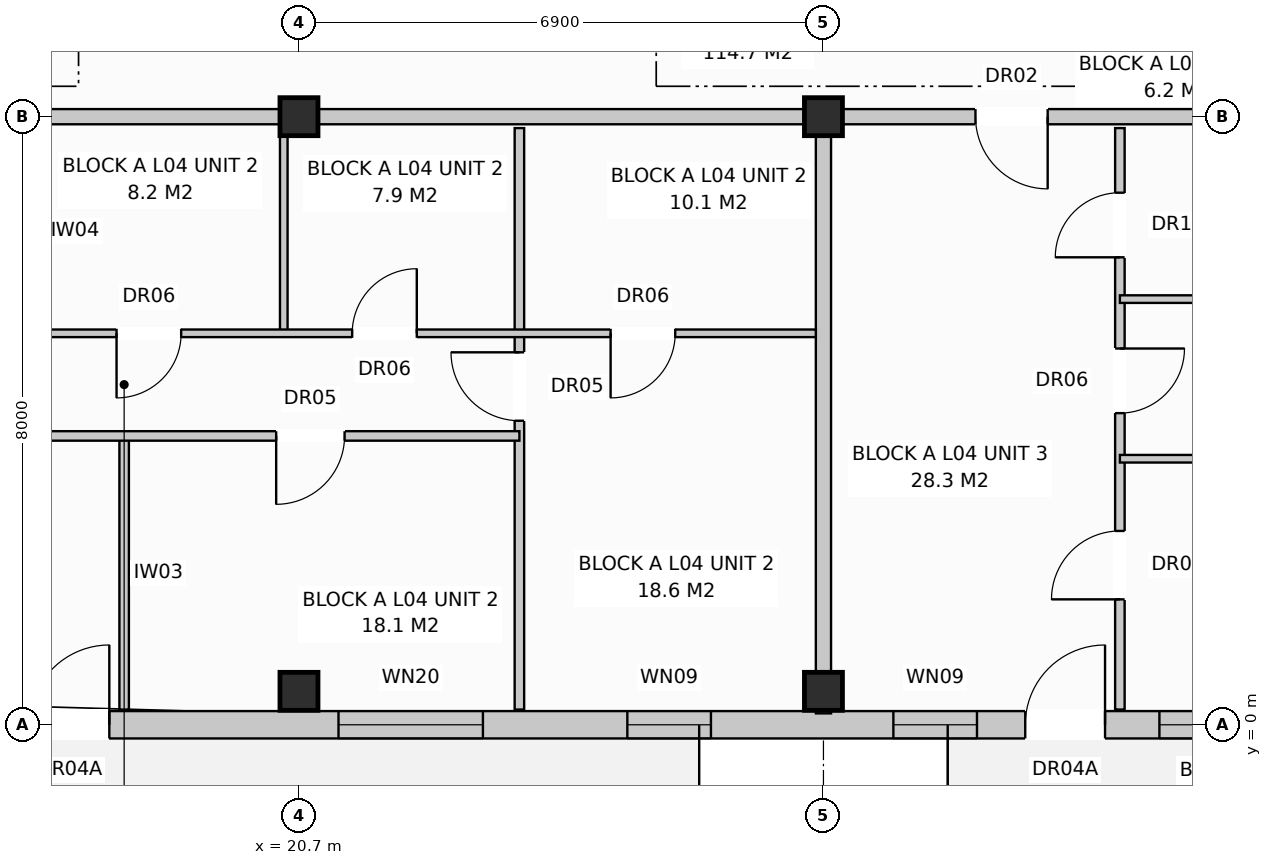
"""IFC4 building model, lengths in metres.
Left out: names, types, materials, properties, quantities, classifications, styles, units other than length and angle.
Written with IfcOpenShell. Run it as: python <this file> out.ifc"""

import sys

from ifc_helpers import new_model, si_unit, direction, frame, frame_2d, origin, origin_with_axes, origin_2d, place, context, subcontext, project, spatial, rectangle, extrude, element, fill, save


model = new_model("IFC4")
c1 = context("Model", 3, precision=1e-05, world=origin(), true_north=direction((0.0, 1.0)))
c2 = subcontext(c1, "Body", "Model", "MODEL_VIEW")
j1 = project(units=[si_unit("LENGTHUNIT", "METRE"), si_unit("PLANEANGLEUNIT", "RADIAN")], contexts=[c1])
p1 = place(None, origin())
s1 = spatial("IfcSite", under=j1, at=p1, CompositionType="ELEMENT")
p2 = place(p1, origin())
s2 = spatial("IfcBuilding", under=s1, at=p2, CompositionType="ELEMENT")
p3 = place(p2, frame((0.0, 0.0, 14.4)))
s3 = spatial("IfcBuildingStorey", under=s2, at=p3, CompositionType="ELEMENT", Elevation=14.4)
for number, where, z_axis, x_axis in (
    (1, (20.7, 0.44, 0.0), (0.0, 0.0, 1.0), (1.0, 0.0, 0.0)),
    (2, (20.7, 8.0, 0.0), (0.0, 0.0, 1.0), (1.0, 0.0, 0.0)),
    (3, (27.6, 0.44, 0.0), (0.0, 0.0, 1.0), (1.0, 0.0, 0.0)),
    (4, (27.6, 8.0, 0.0), (0.0, 0.0, 1.0), (1.0, 0.0, 0.0)),
):
    element("IfcColumn", number, at=place(p3, frame(where, z_axis=z_axis, x_axis=x_axis)), inside=s3, PredefinedType="COLUMN", context=c2, shape_type="SweptSolid", body=[
        extrude(rectangle(XDim=0.5, YDim=0.5, at=origin_2d()), origin(), (0.0, 0.0, 1.0), 3.2),
    ])
p4 = place(p3, frame((0.17, 0.0, 0.0), z_axis=(0.0, 0.0, 1.0), x_axis=(1.0, 0.0, 0.0)))
e5 = element("IfcWall", 5, at=p4, inside=s3, PredefinedType="STANDARD", context=c2, shape_type="SweptSolid", body=[
    extrude(rectangle(XDim=54.86, YDim=0.36, at=frame_2d((27.43, 0.0))), origin(), (0.0, 0.0, 1.0), 2.94),
])
p5 = place(p4, frame((2.485, 0.0, 0.0)))
e6 = element("IfcOpeningElement", 6, at=p5, cuts=e5, PredefinedType="OPENING", context=c2, shape_type="SweptSolid", body=[
    extrude(rectangle(XDim=1.05, YDim=2.12, at=frame_2d((0.525, 1.06))), frame((0.0, 0.192, 0.0), z_axis=(0.0, -1.0, 0.0), x_axis=(1.0, 0.0, 0.0)), (0.0, 0.0, 1.0), 0.384),
])
p6 = place(p4, frame((16.985, 0.0, 0.0)))
e7 = element("IfcOpeningElement", 7, at=p6, cuts=e5, PredefinedType="OPENING", context=c2, shape_type="SweptSolid", body=[
    extrude(rectangle(XDim=1.05, YDim=2.12, at=frame_2d((0.525, 1.06))), frame((0.0, 0.192, 0.0), z_axis=(0.0, -1.0, 0.0), x_axis=(1.0, 0.0, 0.0)), (0.0, 0.0, 1.0), 0.384),
])
p7 = place(p4, frame((30.085, 0.0, 0.0)))
e8 = element("IfcOpeningElement", 8, at=p7, cuts=e5, PredefinedType="OPENING", context=c2, shape_type="SweptSolid", body=[
    extrude(rectangle(XDim=1.05, YDim=2.12, at=frame_2d((0.525, 1.06))), frame((0.0, 0.192, 0.0), z_axis=(0.0, -1.0, 0.0), x_axis=(1.0, 0.0, 0.0)), (0.0, 0.0, 1.0), 0.384),
])
p8 = place(p4, frame((44.141, 0.0, 0.0)))
e9 = element("IfcOpeningElement", 9, at=p8, cuts=e5, PredefinedType="OPENING", context=c2, shape_type="SweptSolid", body=[
    extrude(rectangle(XDim=1.05, YDim=2.12, at=frame_2d((0.525, 1.06))), frame((0.0, 0.192, 0.0), z_axis=(0.0, -1.0, 0.0), x_axis=(1.0, 0.0, 0.0)), (0.0, 0.0, 1.0), 0.384),
])
p9 = place(p4, frame((0.75, 0.0, 0.72)))
e10 = element("IfcOpeningElement", 10, at=p9, cuts=e5, PredefinedType="OPENING", context=c2, shape_type="SweptSolid", body=[
    extrude(rectangle(XDim=1.1, YDim=1.5, at=frame_2d((0.55, 0.75))), frame((0.0, 0.192, 0.0), z_axis=(0.0, -1.0, 0.0), x_axis=(1.0, 0.0, 0.0)), (0.0, 0.0, 1.0), 0.384),
])
p10 = place(p4, frame((4.25, 0.0, 0.72)))
e11 = element("IfcOpeningElement", 11, at=p10, cuts=e5, PredefinedType="OPENING", context=c2, shape_type="SweptSolid", body=[
    extrude(rectangle(XDim=1.9, YDim=1.85, at=frame_2d((0.95, 0.925))), frame((0.0, 0.192, 0.0), z_axis=(0.0, -1.0, 0.0), x_axis=(1.0, 0.0, 0.0)), (0.0, 0.0, 1.0), 0.384),
])
p11 = place(p4, frame((8.925, 0.0, 0.8)))
e12 = element("IfcOpeningElement", 12, at=p11, cuts=e5, PredefinedType="OPENING", context=c2, shape_type="SweptSolid", body=[
    extrude(rectangle(XDim=1.95, YDim=1.65, at=frame_2d((0.975, 0.825))), frame((0.0, 0.192, 0.0), z_axis=(0.0, -1.0, 0.0), x_axis=(1.0, 0.0, 0.0)), (0.0, 0.0, 1.0), 0.384),
])
p12 = place(p4, frame((15.05, 0.0, 0.72)))
e13 = element("IfcOpeningElement", 13, at=p12, cuts=e5, PredefinedType="OPENING", context=c2, shape_type="SweptSolid", body=[
    extrude(rectangle(XDim=1.1, YDim=1.5, at=frame_2d((0.55, 0.75))), frame((0.0, 0.192, 0.0), z_axis=(0.0, -1.0, 0.0), x_axis=(1.0, 0.0, 0.0)), (0.0, 0.0, 1.0), 0.384),
])
p13 = place(p4, frame((21.05, 0.0, 0.72)))
e14 = element("IfcOpeningElement", 14, at=p13, cuts=e5, PredefinedType="OPENING", context=c2, shape_type="SweptSolid", body=[
    extrude(rectangle(XDim=1.9, YDim=1.85, at=frame_2d((0.95, 0.925))), frame((0.0, 0.192, 0.0), z_axis=(0.0, -1.0, 0.0), x_axis=(1.0, 0.0, 0.0)), (0.0, 0.0, 1.0), 0.384),
])
p14 = place(p4, frame((24.85, 0.0, 0.72)))
e15 = element("IfcOpeningElement", 15, at=p14, cuts=e5, PredefinedType="OPENING", context=c2, shape_type="SweptSolid", body=[
    extrude(rectangle(XDim=1.1, YDim=1.5, at=frame_2d((0.55, 0.75))), frame((0.0, 0.192, 0.0), z_axis=(0.0, -1.0, 0.0), x_axis=(1.0, 0.0, 0.0)), (0.0, 0.0, 1.0), 0.384),
])
p15 = place(p4, frame((28.35, 0.0, 0.72)))
e16 = element("IfcOpeningElement", 16, at=p15, cuts=e5, PredefinedType="OPENING", context=c2, shape_type="SweptSolid", body=[
    extrude(rectangle(XDim=1.1, YDim=1.5, at=frame_2d((0.55, 0.75))), frame((0.0, 0.192, 0.0), z_axis=(0.0, -1.0, 0.0), x_axis=(1.0, 0.0, 0.0)), (0.0, 0.0, 1.0), 0.384),
])
p16 = place(p4, frame((31.85, 0.0, 0.72)))
e17 = element("IfcOpeningElement", 17, at=p16, cuts=e5, PredefinedType="OPENING", context=c2, shape_type="SweptSolid", body=[
    extrude(rectangle(XDim=1.9, YDim=1.85, at=frame_2d((0.95, 0.925))), frame((0.0, 0.192, 0.0), z_axis=(0.0, -1.0, 0.0), x_axis=(1.0, 0.0, 0.0)), (0.0, 0.0, 1.0), 0.384),
])
p17 = place(p4, frame((35.525, 0.0, 0.8)))
e18 = element("IfcOpeningElement", 18, at=p17, cuts=e5, PredefinedType="OPENING", context=c2, shape_type="SweptSolid", body=[
    extrude(rectangle(XDim=1.95, YDim=1.65, at=frame_2d((0.975, 0.825))), frame((0.0, 0.192, 0.0), z_axis=(0.0, -1.0, 0.0), x_axis=(1.0, 0.0, 0.0)), (0.0, 0.0, 1.0), 0.384),
])
p18 = place(p4, frame((39.25, 0.0, 0.72)))
e19 = element("IfcOpeningElement", 19, at=p18, cuts=e5, PredefinedType="OPENING", context=c2, shape_type="SweptSolid", body=[
    extrude(rectangle(XDim=1.1, YDim=1.5, at=frame_2d((0.55, 0.75))), frame((0.0, 0.192, 0.0), z_axis=(0.0, -1.0, 0.0), x_axis=(1.0, 0.0, 0.0)), (0.0, 0.0, 1.0), 0.384),
])
p19 = place(p4, frame((42.35, 0.0, 0.72)))
e20 = element("IfcOpeningElement", 20, at=p19, cuts=e5, PredefinedType="OPENING", context=c2, shape_type="SweptSolid", body=[
    extrude(rectangle(XDim=1.1, YDim=1.5, at=frame_2d((0.55, 0.75))), frame((0.0, 0.192, 0.0), z_axis=(0.0, -1.0, 0.0), x_axis=(1.0, 0.0, 0.0)), (0.0, 0.0, 1.0), 0.384),
])
p20 = place(p4, frame((45.725, 0.0, 0.8)))
e21 = element("IfcOpeningElement", 21, at=p20, cuts=e5, PredefinedType="OPENING", context=c2, shape_type="SweptSolid", body=[
    extrude(rectangle(XDim=1.95, YDim=1.65, at=frame_2d((0.975, 0.825))), frame((0.0, 0.192, 0.0), z_axis=(0.0, -1.0, 0.0), x_axis=(1.0, 0.0, 0.0)), (0.0, 0.0, 1.0), 0.384),
])
p21 = place(p4, frame((51.85, 0.0, 0.72)))
e22 = element("IfcOpeningElement", 22, at=p21, cuts=e5, PredefinedType="OPENING", context=c2, shape_type="SweptSolid", body=[
    extrude(rectangle(XDim=1.1, YDim=1.5, at=frame_2d((0.55, 0.75))), frame((0.0, 0.192, 0.0), z_axis=(0.0, -1.0, 0.0), x_axis=(1.0, 0.0, 0.0)), (0.0, 0.0, 1.0), 0.384),
])
p22 = place(p3, frame((27.6, 7.85, 0.0), z_axis=(0.0, 0.0, 1.0), x_axis=(0.0, -1.0, 0.0)))
e23 = element("IfcWall", 23, at=p22, inside=s3, PredefinedType="PARTITIONING", context=c2, shape_type="SweptSolid", body=[
    extrude(rectangle(XDim=7.7, YDim=0.2, at=frame_2d((3.85, 0.0))), origin(), (0.0, 0.0, 1.0), 2.94),
])
p23 = place(p3, frame((6.9, 8.0, 0.0), z_axis=(0.0, 0.0, 1.0), x_axis=(1.0, 0.0, 0.0)))
e24 = element("IfcWall", 24, at=p23, inside=s3, PredefinedType="PARTITIONING", context=c2, shape_type="SweptSolid", body=[
    extrude(rectangle(XDim=20.7, YDim=0.2, at=frame_2d((10.35, 0.0))), origin(), (0.0, 0.0, 1.0), 2.38),
])
p24 = place(p23, frame((2.4, 0.0, 0.0)))
e25 = element("IfcOpeningElement", 25, at=p24, cuts=e24, PredefinedType="OPENING", context=c2, shape_type="SweptSolid", body=[
    extrude(rectangle(XDim=0.95, YDim=2.15, at=frame_2d((0.475, 1.075))), frame((0.0, 0.112, 0.0), z_axis=(0.0, -1.0, 0.0), x_axis=(1.0, 0.0, 0.0)), (0.0, 0.0, 1.0), 0.224),
])
p25 = place(p3, frame((20.5, 7.85, 0.0), z_axis=(0.0, 0.0, 1.0), x_axis=(0.0, -1.0, 0.0)))
e26 = element("IfcWall", 26, at=p25, inside=s3, PredefinedType="PARTITIONING", context=c2, shape_type="SweptSolid", body=[
    extrude(rectangle(XDim=2.7, YDim=0.1, at=frame_2d((1.35, 0.0))), origin(), (0.0, 0.0, 1.0), 2.94),
])
p26 = place(p3, frame((18.4, 3.8, 0.0), z_axis=(0.0, 0.0, 1.0), x_axis=(0.0, -1.0, 0.0)))
e27 = element("IfcWall", 27, at=p26, inside=s3, PredefinedType="PARTITIONING", context=c2, shape_type="SweptSolid", body=[
    extrude(rectangle(XDim=3.6, YDim=0.125, at=frame_2d((1.8, 0.0))), origin(), (0.0, 0.0, 1.0), 2.94),
])
p27 = place(p3, frame((23.6, 7.85, 0.0), z_axis=(0.0, 0.0, 1.0), x_axis=(0.0, -1.0, 0.0)))
e28 = element("IfcWall", 28, at=p27, inside=s3, PredefinedType="PARTITIONING", context=c2, shape_type="SweptSolid", body=[
    extrude(rectangle(XDim=7.65, YDim=0.125, at=frame_2d((3.825, 0.0))), origin(), (0.0, 0.0, 1.0), 2.94),
])
p28 = place(p27, frame((2.95, 0.0, 0.0)))
e29 = element("IfcOpeningElement", 29, at=p28, cuts=e28, PredefinedType="OPENING", context=c2, shape_type="SweptSolid", body=[
    extrude(rectangle(XDim=0.9, YDim=2.1, at=frame_2d((0.45, 1.05))), frame((0.0, 0.074, 0.0), z_axis=(0.0, -1.0, 0.0), x_axis=(1.0, 0.0, 0.0)), (0.0, 0.0, 1.0), 0.149),
])
p29 = place(p3, frame((13.2, 5.15, 0.0), z_axis=(0.0, 0.0, 1.0), x_axis=(1.0, 0.0, 0.0)))
e30 = element("IfcWall", 30, at=p29, inside=s3, PredefinedType="PARTITIONING", context=c2, shape_type="SweptSolid", body=[
    extrude(rectangle(XDim=14.3, YDim=0.1, at=frame_2d((7.15, 0.0))), origin(), (0.0, 0.0, 1.0), 2.94),
])
p30 = place(p29, frame((1.6, 0.0, 0.0)))
e31 = element("IfcOpeningElement", 31, at=p30, cuts=e30, PredefinedType="OPENING", context=c2, shape_type="SweptSolid", body=[
    extrude(rectangle(XDim=0.9, YDim=2.1, at=frame_2d((0.45, 1.05))), frame((0.0, 0.062, 0.0), z_axis=(0.0, -1.0, 0.0), x_axis=(1.0, 0.0, 0.0)), (0.0, 0.0, 1.0), 0.124),
])
p31 = place(p29, frame((5.1, 0.0, 0.0)))
e32 = element("IfcOpeningElement", 32, at=p31, cuts=e30, PredefinedType="OPENING", context=c2, shape_type="SweptSolid", body=[
    extrude(rectangle(XDim=0.85, YDim=2.05, at=frame_2d((0.425, 1.025))), frame((0.0, 0.062, 0.0), z_axis=(0.0, -1.0, 0.0), x_axis=(1.0, 0.0, 0.0)), (0.0, 0.0, 1.0), 0.124),
])
p32 = place(p29, frame((8.2, 0.0, 0.0)))
e33 = element("IfcOpeningElement", 33, at=p32, cuts=e30, PredefinedType="OPENING", context=c2, shape_type="SweptSolid", body=[
    extrude(rectangle(XDim=0.85, YDim=2.05, at=frame_2d((0.425, 1.025))), frame((0.0, 0.062, 0.0), z_axis=(0.0, -1.0, 0.0), x_axis=(1.0, 0.0, 0.0)), (0.0, 0.0, 1.0), 0.124),
])
p33 = place(p29, frame((11.6, 0.0, 0.0)))
e34 = element("IfcOpeningElement", 34, at=p33, cuts=e30, PredefinedType="OPENING", context=c2, shape_type="SweptSolid", body=[
    extrude(rectangle(XDim=0.85, YDim=2.05, at=frame_2d((0.425, 1.025))), frame((0.0, 0.062, 0.0), z_axis=(0.0, -1.0, 0.0), x_axis=(1.0, 0.0, 0.0)), (0.0, 0.0, 1.0), 0.124),
])
p34 = place(p3, frame((13.2, 3.8, 0.0), z_axis=(0.0, 0.0, 1.0), x_axis=(1.0, 0.0, 0.0)))
e35 = element("IfcWall", 35, at=p34, inside=s3, PredefinedType="PARTITIONING", context=c2, shape_type="SweptSolid", body=[
    extrude(rectangle(XDim=10.4, YDim=0.125, at=frame_2d((5.2, 0.0))), origin(), (0.0, 0.0, 1.0), 2.94),
])
p35 = place(p34, frame((2.0, 0.0, 0.0)))
e36 = element("IfcOpeningElement", 36, at=p35, cuts=e35, PredefinedType="OPENING", context=c2, shape_type="SweptSolid", body=[
    extrude(rectangle(XDim=0.9, YDim=2.1, at=frame_2d((0.45, 1.05))), frame((0.0, 0.074, 0.0), z_axis=(0.0, -1.0, 0.0), x_axis=(1.0, 0.0, 0.0)), (0.0, 0.0, 1.0), 0.149),
])
p36 = place(p34, frame((7.2, 0.0, 0.0)))
e37 = element("IfcOpeningElement", 37, at=p36, cuts=e35, PredefinedType="OPENING", context=c2, shape_type="SweptSolid", body=[
    extrude(rectangle(XDim=0.9, YDim=2.1, at=frame_2d((0.45, 1.05))), frame((0.0, 0.074, 0.0), z_axis=(0.0, -1.0, 0.0), x_axis=(1.0, 0.0, 0.0)), (0.0, 0.0, 1.0), 0.149),
])
p37 = place(p3, frame((27.6, 8.0, 0.0), z_axis=(0.0, 0.0, 1.0), x_axis=(1.0, 0.0, 0.0)))
e38 = element("IfcWall", 38, at=p37, inside=s3, PredefinedType="PARTITIONING", context=c2, shape_type="SweptSolid", body=[
    extrude(rectangle(XDim=6.9, YDim=0.2, at=frame_2d((3.45, 0.0))), origin(), (0.0, 0.0, 1.0), 2.38),
])
p38 = place(p37, frame((2.0, 0.0, 0.0)))
e39 = element("IfcOpeningElement", 39, at=p38, cuts=e38, PredefinedType="OPENING", context=c2, shape_type="SweptSolid", body=[
    extrude(rectangle(XDim=0.95, YDim=2.15, at=frame_2d((0.475, 1.075))), frame((0.0, 0.112, 0.0), z_axis=(0.0, -1.0, 0.0), x_axis=(1.0, 0.0, 0.0)), (0.0, 0.0, 1.0), 0.224),
])
p39 = place(p3, frame((31.5, 7.85, 0.0), z_axis=(0.0, 0.0, 1.0), x_axis=(0.0, -1.0, 0.0)))
e40 = element("IfcWall", 40, at=p39, inside=s3, PredefinedType="PARTITIONING", context=c2, shape_type="SweptSolid", body=[
    extrude(rectangle(XDim=7.65, YDim=0.125, at=frame_2d((3.825, 0.0))), origin(), (0.0, 0.0, 1.0), 2.94),
])
p40 = place(p39, frame((0.85, 0.0, 0.0)))
e41 = element("IfcOpeningElement", 41, at=p40, cuts=e40, PredefinedType="OPENING", context=c2, shape_type="SweptSolid", body=[
    extrude(rectangle(XDim=0.85, YDim=2.1, at=frame_2d((0.425, 1.05))), frame((0.0, 0.074, 0.0), z_axis=(0.0, -1.0, 0.0), x_axis=(1.0, 0.0, 0.0)), (0.0, 0.0, 1.0), 0.149),
])
p41 = place(p39, frame((2.9, 0.0, 0.0)))
e42 = element("IfcOpeningElement", 42, at=p41, cuts=e40, PredefinedType="OPENING", context=c2, shape_type="SweptSolid", body=[
    extrude(rectangle(XDim=0.85, YDim=2.05, at=frame_2d((0.425, 1.025))), frame((0.0, 0.074, 0.0), z_axis=(0.0, -1.0, 0.0), x_axis=(1.0, 0.0, 0.0)), (0.0, 0.0, 1.0), 0.149),
])
p42 = place(p39, frame((5.3, 0.0, 0.0)))
e43 = element("IfcOpeningElement", 43, at=p42, cuts=e40, PredefinedType="OPENING", context=c2, shape_type="SweptSolid", body=[
    extrude(rectangle(XDim=0.9, YDim=2.1, at=frame_2d((0.45, 1.05))), frame((0.0, 0.074, 0.0), z_axis=(0.0, -1.0, 0.0), x_axis=(1.0, 0.0, 0.0)), (0.0, 0.0, 1.0), 0.149),
])
for number, where, z_axis, x_axis in (
    (44, (31.5, 5.6, 0.0), (0.0, 0.0, 1.0), (1.0, 0.0, 0.0)),
    (45, (31.5, 3.5, 0.0), (0.0, 0.0, 1.0), (1.0, 0.0, 0.0)),
):
    element("IfcWall", number, at=place(p3, frame(where, z_axis=z_axis, x_axis=x_axis)), inside=s3, PredefinedType="PARTITIONING", context=c2, shape_type="SweptSolid", body=[
        extrude(rectangle(XDim=2.9, YDim=0.1, at=frame_2d((1.45, 0.0))), origin(), (0.0, 0.0, 1.0), 2.94),
    ])
p43 = place(p6, origin_with_axes())
e46 = element("IfcDoor", 46, at=p43, inside=s3, OperationType="SINGLE_SWING_RIGHT", PredefinedType="DOOR", context=c2, shape_type="SweptSolid", body=[
    extrude(rectangle(XDim=1.05, YDim=2.12, at=frame_2d((0.525, 1.06))), frame((0.0, 0.025, 0.0), z_axis=(0.0, -1.0, 0.0), x_axis=(1.0, 0.0, 0.0)), (0.0, 0.0, 1.0), 0.05),
])
fill(e7, e46)
p44 = place(p7, origin_with_axes())
e47 = element("IfcDoor", 47, at=p44, inside=s3, OperationType="SINGLE_SWING_RIGHT", PredefinedType="DOOR", context=c2, shape_type="SweptSolid", body=[
    extrude(rectangle(XDim=1.05, YDim=2.12, at=frame_2d((0.525, 1.06))), frame((0.0, 0.025, 0.0), z_axis=(0.0, -1.0, 0.0), x_axis=(1.0, 0.0, 0.0)), (0.0, 0.0, 1.0), 0.05),
])
fill(e8, e47)
p45 = place(p13, origin_with_axes())
e48 = element("IfcWindow", 48, at=p45, inside=s3, PartitioningType="SINGLE_PANEL", PredefinedType="WINDOW", context=c2, shape_type="SweptSolid", body=[
    extrude(rectangle(XDim=1.9, YDim=1.85, at=frame_2d((0.95, 0.925))), frame((0.0, 0.03, 0.0), z_axis=(0.0, -1.0, 0.0), x_axis=(1.0, 0.0, 0.0)), (0.0, 0.0, 1.0), 0.06),
])
fill(e14, e48)
p46 = place(p14, origin_with_axes())
e49 = element("IfcWindow", 49, at=p46, inside=s3, PartitioningType="SINGLE_PANEL", PredefinedType="WINDOW", context=c2, shape_type="SweptSolid", body=[
    extrude(rectangle(XDim=1.1, YDim=1.5, at=frame_2d((0.55, 0.75))), frame((0.0, 0.03, 0.0), z_axis=(0.0, -1.0, 0.0), x_axis=(1.0, 0.0, 0.0)), (0.0, 0.0, 1.0), 0.06),
])
fill(e15, e49)
p47 = place(p15, origin_with_axes())
e50 = element("IfcWindow", 50, at=p47, inside=s3, PartitioningType="SINGLE_PANEL", PredefinedType="WINDOW", context=c2, shape_type="SweptSolid", body=[
    extrude(rectangle(XDim=1.1, YDim=1.5, at=frame_2d((0.55, 0.75))), frame((0.0, 0.03, 0.0), z_axis=(0.0, -1.0, 0.0), x_axis=(1.0, 0.0, 0.0)), (0.0, 0.0, 1.0), 0.06),
])
fill(e16, e50)
p48 = place(p16, origin_with_axes())
e51 = element("IfcWindow", 51, at=p48, inside=s3, PartitioningType="SINGLE_PANEL", PredefinedType="WINDOW", context=c2, shape_type="SweptSolid", body=[
    extrude(rectangle(XDim=1.9, YDim=1.85, at=frame_2d((0.95, 0.925))), frame((0.0, 0.03, 0.0), z_axis=(0.0, -1.0, 0.0), x_axis=(1.0, 0.0, 0.0)), (0.0, 0.0, 1.0), 0.06),
])
fill(e17, e51)
p49 = place(p28, frame((0.9, 0.0, 0.0), z_axis=(0.0, 0.0, 1.0), x_axis=(-1.0, 0.0, 0.0)))
e52 = element("IfcDoor", 52, at=p49, inside=s3, OperationType="SINGLE_SWING_LEFT", PredefinedType="DOOR", context=c2, shape_type="SweptSolid", body=[
    extrude(rectangle(XDim=0.9, YDim=2.1, at=frame_2d((0.45, 1.05))), frame((0.0, 0.025, 0.0), z_axis=(0.0, -1.0, 0.0), x_axis=(1.0, 0.0, 0.0)), (0.0, 0.0, 1.0), 0.05),
])
fill(e29, e52)
p50 = place(p31, frame((0.85, 0.0, 0.0), z_axis=(0.0, 0.0, 1.0), x_axis=(-1.0, 0.0, 0.0)))
e53 = element("IfcDoor", 53, at=p50, inside=s3, OperationType="SINGLE_SWING_LEFT", PredefinedType="DOOR", context=c2, shape_type="SweptSolid", body=[
    extrude(rectangle(XDim=0.85, YDim=2.05, at=frame_2d((0.425, 1.025))), frame((0.0, 0.025, 0.0), z_axis=(0.0, -1.0, 0.0), x_axis=(1.0, 0.0, 0.0)), (0.0, 0.0, 1.0), 0.05),
])
fill(e32, e53)
p51 = place(p32, origin_with_axes())
e54 = element("IfcDoor", 54, at=p51, inside=s3, OperationType="SINGLE_SWING_RIGHT", PredefinedType="DOOR", context=c2, shape_type="SweptSolid", body=[
    extrude(rectangle(XDim=0.85, YDim=2.05, at=frame_2d((0.425, 1.025))), frame((0.0, 0.025, 0.0), z_axis=(0.0, -1.0, 0.0), x_axis=(1.0, 0.0, 0.0)), (0.0, 0.0, 1.0), 0.05),
])
fill(e33, e54)
p52 = place(p33, frame((0.85, 0.0, 0.0), z_axis=(0.0, 0.0, 1.0), x_axis=(-1.0, 0.0, 0.0)))
e55 = element("IfcDoor", 55, at=p52, inside=s3, OperationType="SINGLE_SWING_LEFT", PredefinedType="DOOR", context=c2, shape_type="SweptSolid", body=[
    extrude(rectangle(XDim=0.85, YDim=2.05, at=frame_2d((0.425, 1.025))), frame((0.0, 0.025, 0.0), z_axis=(0.0, -1.0, 0.0), x_axis=(1.0, 0.0, 0.0)), (0.0, 0.0, 1.0), 0.05),
])
fill(e34, e55)
p53 = place(p36, frame((0.9, 0.0, 0.0), z_axis=(0.0, 0.0, 1.0), x_axis=(-1.0, 0.0, 0.0)))
e56 = element("IfcDoor", 56, at=p53, inside=s3, OperationType="SINGLE_SWING_LEFT", PredefinedType="DOOR", context=c2, shape_type="SweptSolid", body=[
    extrude(rectangle(XDim=0.9, YDim=2.1, at=frame_2d((0.45, 1.05))), frame((0.0, 0.025, 0.0), z_axis=(0.0, -1.0, 0.0), x_axis=(1.0, 0.0, 0.0)), (0.0, 0.0, 1.0), 0.05),
])
fill(e37, e56)
p54 = place(p38, frame((0.95, 0.0, 0.0), z_axis=(0.0, 0.0, 1.0), x_axis=(-1.0, 0.0, 0.0)))
e57 = element("IfcDoor", 57, at=p54, inside=s3, OperationType="SINGLE_SWING_RIGHT", PredefinedType="DOOR", context=c2, shape_type="SweptSolid", body=[
    extrude(rectangle(XDim=0.95, YDim=2.15, at=frame_2d((0.475, 1.075))), frame((0.0, 0.025, 0.0), z_axis=(0.0, -1.0, 0.0), x_axis=(1.0, 0.0, 0.0)), (0.0, 0.0, 1.0), 0.05),
])
fill(e39, e57)
p55 = place(p40, frame((0.85, 0.0, 0.0), z_axis=(0.0, 0.0, 1.0), x_axis=(-1.0, 0.0, 0.0)))
e58 = element("IfcDoor", 58, at=p55, inside=s3, OperationType="SINGLE_SWING_RIGHT", PredefinedType="DOOR", context=c2, shape_type="SweptSolid", body=[
    extrude(rectangle(XDim=0.85, YDim=2.1, at=frame_2d((0.425, 1.05))), frame((0.0, 0.025, 0.0), z_axis=(0.0, -1.0, 0.0), x_axis=(1.0, 0.0, 0.0)), (0.0, 0.0, 1.0), 0.05),
])
fill(e41, e58)
p56 = place(p41, origin_with_axes())
e59 = element("IfcDoor", 59, at=p56, inside=s3, OperationType="SINGLE_SWING_LEFT", PredefinedType="DOOR", context=c2, shape_type="SweptSolid", body=[
    extrude(rectangle(XDim=0.85, YDim=2.05, at=frame_2d((0.425, 1.025))), frame((0.0, 0.025, 0.0), z_axis=(0.0, -1.0, 0.0), x_axis=(1.0, 0.0, 0.0)), (0.0, 0.0, 1.0), 0.05),
])
fill(e42, e59)
p57 = place(p42, frame((0.9, 0.0, 0.0), z_axis=(0.0, 0.0, 1.0), x_axis=(-1.0, 0.0, 0.0)))
e60 = element("IfcDoor", 60, at=p57, inside=s3, OperationType="SINGLE_SWING_RIGHT", PredefinedType="DOOR", context=c2, shape_type="SweptSolid", body=[
    extrude(rectangle(XDim=0.9, YDim=2.1, at=frame_2d((0.45, 1.05))), frame((0.0, 0.025, 0.0), z_axis=(0.0, -1.0, 0.0), x_axis=(1.0, 0.0, 0.0)), (0.0, 0.0, 1.0), 0.05),
])
fill(e43, e60)
save(model, sys.argv[1])
